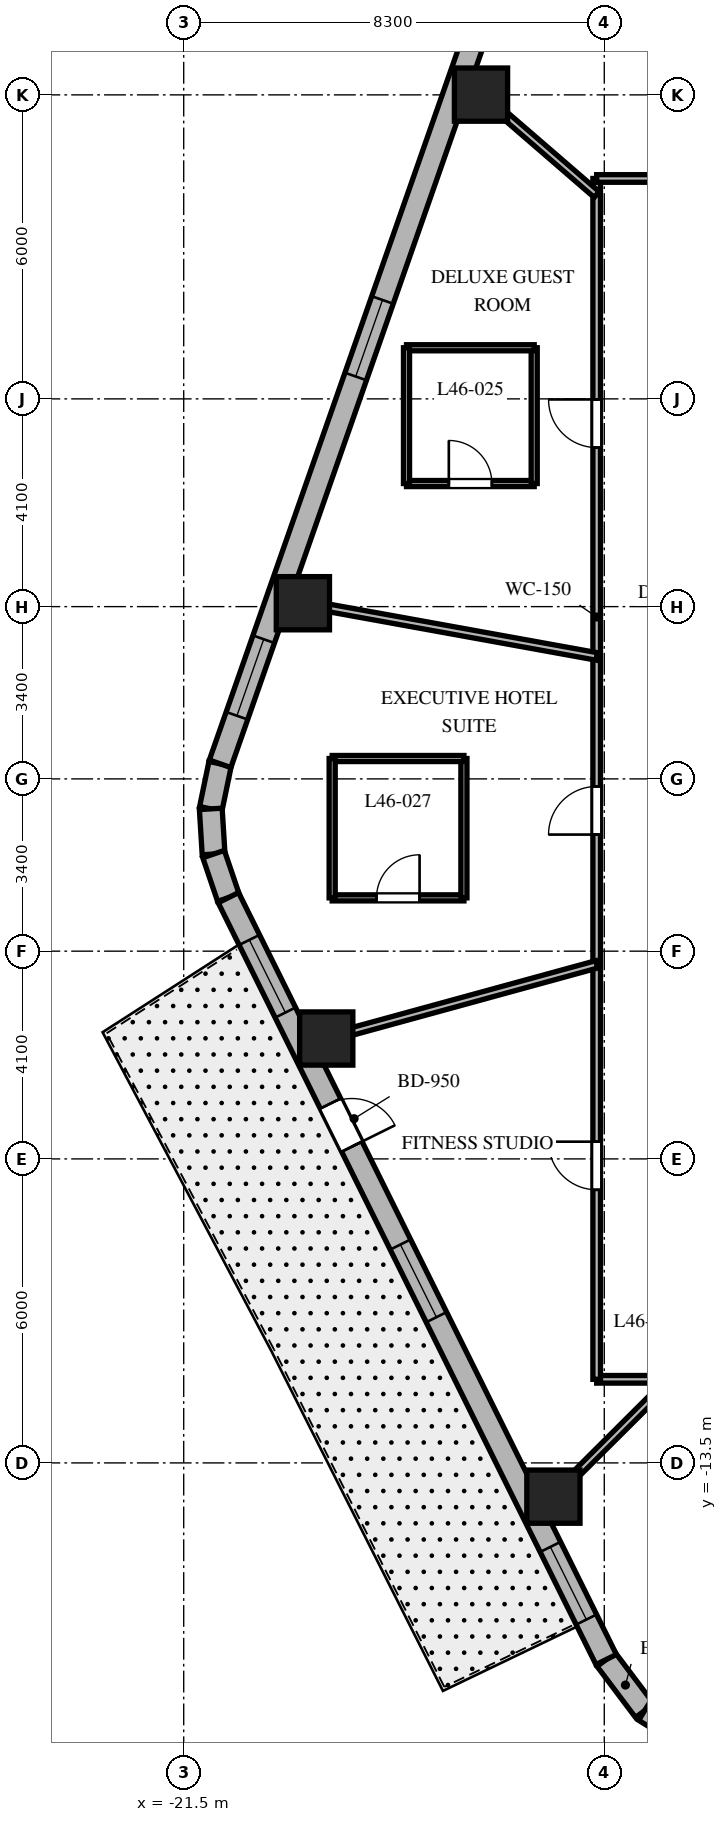
"""IFC4 building model, lengths in metres.
Left out: names, types, materials, properties, quantities, classifications, styles, units other than length and angle.
Written with IfcOpenShell. Run it as: python <this file> out.ifc"""

import sys

from ifc_helpers import new_model, si_unit, direction, frame, frame_2d, origin, origin_2d, place, context, subcontext, project, spatial, rectangle, extrude, element, fill, save


model = new_model("IFC4")
c1 = context("Model", 3, precision=1e-05, world=origin(), true_north=direction((0.0, 1.0)))
c2 = subcontext(c1, "Body", "Model", "MODEL_VIEW")
j1 = project(units=[si_unit("LENGTHUNIT", "METRE"), si_unit("PLANEANGLEUNIT", "RADIAN")], contexts=[c1])
p1 = place(None, origin())
s1 = spatial("IfcSite", under=j1, at=p1, CompositionType="ELEMENT")
p2 = place(p1, origin())
s2 = spatial("IfcBuilding", under=s1, at=p2, CompositionType="ELEMENT")
p3 = place(p2, frame((0.0, 0.0, 186.7)))
s3 = spatial("IfcBuildingStorey", under=s2, at=p3, CompositionType="ELEMENT", Elevation=186.7)
for number, where, z_axis, x_axis in (
    (1, (-15.633, 13.505, 0.0), (0.0, 0.0, 1.0), (1.0, 0.0, 0.0)),
    (2, (-19.148, 3.467, 0.0), (0.0, 0.0, 1.0), (1.0, 0.0, 0.0)),
    (3, (-18.687, -5.124, 0.0), (0.0, 0.0, 1.0), (1.0, 0.0, 0.0)),
    (4, (-14.204, -14.166, 0.0), (0.0, 0.0, 1.0), (1.0, 0.0, 0.0)),
):
    element("IfcColumn", number, at=place(p3, frame(where, z_axis=z_axis, x_axis=x_axis)), inside=s3, PredefinedType="COLUMN", context=c2, shape_type="SweptSolid", body=[
        extrude(rectangle(XDim=1.05, YDim=1.05, at=origin_2d()), origin(), (0.0, 0.0, 1.0), 3.7),
    ])
p4 = place(p3, frame((-13.162, -17.381, 0.0), z_axis=(0.0, 0.0, 1.0), x_axis=(0.601515770517, -0.798860925205, 0.0)))
e5 = element("IfcWall", 5, at=p4, inside=s3, PredefinedType="SOLIDWALL", context=c2, shape_type="SweptSolid", body=[
    extrude(rectangle(XDim=1.262, YDim=0.45, at=frame_2d((0.631, 0.0))), origin(), (0.0, 0.0, 1.0), 3.4),
])
p5 = place(p3, frame((-12.403, -18.389, 0.0), z_axis=(0.0, 0.0, 1.0), x_axis=(0.849795170926, -0.527113049991, 0.0)))
e6 = element("IfcWall", 6, at=p5, inside=s3, PredefinedType="SOLIDWALL", context=c2, shape_type="SweptSolid", body=[
    extrude(rectangle(XDim=1.241, YDim=0.45, at=frame_2d((0.62, 0.0))), origin(), (0.0, 0.0, 1.0), 3.4),
])
p6 = place(p3, frame((-20.782, 0.298, 0.0), z_axis=(0.0, 0.0, 1.0), x_axis=(-0.202570068411, -0.979267771033, 0.0)))
e7 = element("IfcWall", 7, at=p6, inside=s3, PredefinedType="SOLIDWALL", context=c2, shape_type="SweptSolid", body=[
    extrude(rectangle(XDim=0.909, YDim=0.45, at=frame_2d((0.454, 0.0))), origin(), (0.0, 0.0, 1.0), 3.4),
])
p7 = place(p3, frame((-20.966, -0.592, 0.0), z_axis=(0.0, 0.0, 1.0), x_axis=(0.061748898935, -0.998091715966, 0.0)))
e8 = element("IfcWall", 8, at=p7, inside=s3, PredefinedType="SOLIDWALL", context=c2, shape_type="SweptSolid", body=[
    extrude(rectangle(XDim=0.894, YDim=0.45, at=frame_2d((0.447, 0.0))), origin(), (0.0, 0.0, 1.0), 3.4),
])
p8 = place(p3, frame((-20.911, -1.484, 0.0), z_axis=(0.0, 0.0, 1.0), x_axis=(0.321623334353, -0.946867694453, 0.0)))
e9 = element("IfcWall", 9, at=p8, inside=s3, PredefinedType="SOLIDWALL", context=c2, shape_type="SweptSolid", body=[
    extrude(rectangle(XDim=0.909, YDim=0.45, at=frame_2d((0.454, 0.0))), origin(), (0.0, 0.0, 1.0), 3.4),
])
p9 = place(p3, frame((-14.937, 16.993, 0.0), z_axis=(0.0, 0.0, 1.0), x_axis=(-0.330431575061, -0.943829949834, 0.0)))
e10 = element("IfcWall", 10, at=p9, inside=s3, PredefinedType="SOLIDWALL", context=c2, shape_type="SweptSolid", body=[
    extrude(rectangle(XDim=17.689, YDim=0.45, at=frame_2d((8.844, 0.0))), origin(), (0.0, 0.0, 1.0), 3.4),
])
p10 = place(p9, frame((0.95, 0.0, 0.8)))
e11 = element("IfcOpeningElement", 11, at=p10, cuts=e10, PredefinedType="OPENING", context=c2, shape_type="SweptSolid", body=[
    extrude(rectangle(XDim=1.6, YDim=1.75, at=frame_2d((0.8, 0.875))), frame((0.0, 0.235, 0.0), z_axis=(0.0, -1.0, 0.0), x_axis=(1.0, 0.0, 0.0)), (0.0, 0.0, 1.0), 0.47),
])
p11 = place(p9, frame((7.99, 0.0, 0.8)))
e12 = element("IfcOpeningElement", 12, at=p11, cuts=e10, PredefinedType="OPENING", context=c2, shape_type="SweptSolid", body=[
    extrude(rectangle(XDim=1.6, YDim=1.75, at=frame_2d((0.8, 0.875))), frame((0.0, 0.235, 0.0), z_axis=(0.0, -1.0, 0.0), x_axis=(1.0, 0.0, 0.0)), (0.0, 0.0, 1.0), 0.47),
])
p12 = place(p9, frame((15.084, 0.0, 0.8)))
e13 = element("IfcOpeningElement", 13, at=p12, cuts=e10, PredefinedType="OPENING", context=c2, shape_type="SweptSolid", body=[
    extrude(rectangle(XDim=1.6, YDim=1.75, at=frame_2d((0.8, 0.875))), frame((0.0, 0.235, 0.0), z_axis=(0.0, -1.0, 0.0), x_axis=(1.0, 0.0, 0.0)), (0.0, 0.0, 1.0), 0.47),
])
p13 = place(p3, frame((-20.618, -2.344, 0.0), z_axis=(0.0, 0.0, 1.0), x_axis=(0.444243691097, -0.895905990002, 0.0)))
e14 = element("IfcWall", 14, at=p13, inside=s3, PredefinedType="SOLIDWALL", context=c2, shape_type="SweptSolid", body=[
    extrude(rectangle(XDim=16.784, YDim=0.45, at=frame_2d((8.392, 0.0))), origin(), (0.0, 0.0, 1.0), 3.4),
])
p14 = place(p13, frame((4.535, 0.0, 0.0)))
e15 = element("IfcOpeningElement", 15, at=p14, cuts=e14, PredefinedType="OPENING", context=c2, shape_type="SweptSolid", body=[
    extrude(rectangle(XDim=0.95, YDim=2.15, at=frame_2d((0.475, 1.075))), frame((0.0, 0.235, 0.0), z_axis=(0.0, -1.0, 0.0), x_axis=(1.0, 0.0, 0.0)), (0.0, 0.0, 1.0), 0.47),
])
p15 = place(p13, frame((0.931, 0.0, 0.8)))
e16 = element("IfcOpeningElement", 16, at=p15, cuts=e14, PredefinedType="OPENING", context=c2, shape_type="SweptSolid", body=[
    extrude(rectangle(XDim=1.6, YDim=1.75, at=frame_2d((0.8, 0.875))), frame((0.0, 0.235, 0.0), z_axis=(0.0, -1.0, 0.0), x_axis=(1.0, 0.0, 0.0)), (0.0, 0.0, 1.0), 0.47),
])
p16 = place(p13, frame((7.642, 0.0, 0.8)))
e17 = element("IfcOpeningElement", 17, at=p16, cuts=e14, PredefinedType="OPENING", context=c2, shape_type="SweptSolid", body=[
    extrude(rectangle(XDim=1.6, YDim=1.75, at=frame_2d((0.8, 0.875))), frame((0.0, 0.235, 0.0), z_axis=(0.0, -1.0, 0.0), x_axis=(1.0, 0.0, 0.0)), (0.0, 0.0, 1.0), 0.47),
])
p17 = place(p13, frame((14.303, 0.0, 0.8)))
e18 = element("IfcOpeningElement", 18, at=p17, cuts=e14, PredefinedType="OPENING", context=c2, shape_type="SweptSolid", body=[
    extrude(rectangle(XDim=1.6, YDim=1.75, at=frame_2d((0.8, 0.875))), frame((0.0, 0.235, 0.0), z_axis=(0.0, -1.0, 0.0), x_axis=(1.0, 0.0, 0.0)), (0.0, 0.0, 1.0), 0.47),
])
p18 = place(p3, frame((13.35, -11.85, 0.0), z_axis=(0.0, 0.0, 1.0), x_axis=(-1.0, 0.0, 0.0)))
e19 = element("IfcWall", 19, at=p18, inside=s3, PredefinedType="PARTITIONING", context=c2, shape_type="SweptSolid", body=[
    extrude(rectangle(XDim=26.7, YDim=0.15, at=frame_2d((13.35, 0.0))), origin(), (0.0, 0.0, 1.0), 2.84),
])
p19 = place(p18, frame((22.459, 0.0, 0.0)))
e20 = element("IfcOpeningElement", 20, at=p19, cuts=e19, PredefinedType="OPENING", context=c2, shape_type="SweptSolid", body=[
    extrude(rectangle(XDim=0.9, YDim=2.03, at=frame_2d((0.45, 1.015))), frame((0.0, 0.085, 0.0), z_axis=(0.0, -1.0, 0.0), x_axis=(1.0, 0.0, 0.0)), (0.0, 0.0, 1.0), 0.17),
])
p20 = place(p18, frame((18.304, 0.0, 0.0)))
e21 = element("IfcOpeningElement", 21, at=p20, cuts=e19, PredefinedType="OPENING", context=c2, shape_type="SweptSolid", body=[
    extrude(rectangle(XDim=0.9, YDim=2.03, at=frame_2d((0.45, 1.015))), frame((0.0, 0.085, 0.0), z_axis=(0.0, -1.0, 0.0), x_axis=(1.0, 0.0, 0.0)), (0.0, 0.0, 1.0), 0.17),
])
p21 = place(p18, frame((12.362, 0.0, 0.0)))
e22 = element("IfcOpeningElement", 22, at=p21, cuts=e19, PredefinedType="OPENING", context=c2, shape_type="SweptSolid", body=[
    extrude(rectangle(XDim=0.95, YDim=2.03, at=frame_2d((0.475, 1.015))), frame((0.0, 0.085, 0.0), z_axis=(0.0, -1.0, 0.0), x_axis=(1.0, 0.0, 0.0)), (0.0, 0.0, 1.0), 0.17),
])
p22 = place(p18, frame((3.995, 0.0, 0.0)))
e23 = element("IfcOpeningElement", 23, at=p22, cuts=e19, PredefinedType="OPENING", context=c2, shape_type="SweptSolid", body=[
    extrude(rectangle(XDim=0.95, YDim=2.03, at=frame_2d((0.475, 1.015))), frame((0.0, 0.085, 0.0), z_axis=(0.0, -1.0, 0.0), x_axis=(1.0, 0.0, 0.0)), (0.0, 0.0, 1.0), 0.17),
])
p23 = place(p3, frame((-13.35, -11.85, 0.0), z_axis=(0.0, 0.0, 1.0), x_axis=(0.0, 1.0, 0.0)))
e24 = element("IfcWall", 24, at=p23, inside=s3, PredefinedType="PARTITIONING", context=c2, shape_type="SweptSolid", body=[
    extrude(rectangle(XDim=23.7, YDim=0.15, at=frame_2d((11.85, 0.0))), origin(), (0.0, 0.0, 1.0), 2.84),
])
p24 = place(p23, frame((18.389, 0.0, 0.0)))
e25 = element("IfcOpeningElement", 25, at=p24, cuts=e24, PredefinedType="OPENING", context=c2, shape_type="SweptSolid", body=[
    extrude(rectangle(XDim=0.95, YDim=2.03, at=frame_2d((0.475, 1.015))), frame((0.0, 0.085, 0.0), z_axis=(0.0, -1.0, 0.0), x_axis=(1.0, 0.0, 0.0)), (0.0, 0.0, 1.0), 0.17),
])
p25 = place(p23, frame((10.751, 0.0, 0.0)))
e26 = element("IfcOpeningElement", 26, at=p25, cuts=e24, PredefinedType="OPENING", context=c2, shape_type="SweptSolid", body=[
    extrude(rectangle(XDim=0.95, YDim=2.03, at=frame_2d((0.475, 1.015))), frame((0.0, 0.085, 0.0), z_axis=(0.0, -1.0, 0.0), x_axis=(1.0, 0.0, 0.0)), (0.0, 0.0, 1.0), 0.17),
])
p26 = place(p23, frame((3.74, 0.0, 0.0)))
e27 = element("IfcOpeningElement", 27, at=p26, cuts=e24, PredefinedType="OPENING", context=c2, shape_type="SweptSolid", body=[
    extrude(rectangle(XDim=0.95, YDim=2.03, at=frame_2d((0.475, 1.015))), frame((0.0, 0.085, 0.0), z_axis=(0.0, -1.0, 0.0), x_axis=(1.0, 0.0, 0.0)), (0.0, 0.0, 1.0), 0.17),
])
p27 = place(p3, frame((-13.35, 11.85, 0.0), z_axis=(0.0, 0.0, 1.0), x_axis=(1.0, 0.0, 0.0)))
e28 = element("IfcWall", 28, at=p27, inside=s3, PredefinedType="PARTITIONING", context=c2, shape_type="SweptSolid", body=[
    extrude(rectangle(XDim=26.7, YDim=0.15, at=frame_2d((13.35, 0.0))), origin(), (0.0, 0.0, 1.0), 2.84),
])
p28 = place(p27, frame((20.682, 0.0, 0.0)))
e29 = element("IfcOpeningElement", 29, at=p28, cuts=e28, PredefinedType="OPENING", context=c2, shape_type="SweptSolid", body=[
    extrude(rectangle(XDim=0.95, YDim=2.03, at=frame_2d((0.475, 1.015))), frame((0.0, 0.085, 0.0), z_axis=(0.0, -1.0, 0.0), x_axis=(1.0, 0.0, 0.0)), (0.0, 0.0, 1.0), 0.17),
])
p29 = place(p27, frame((12.362, 0.0, 0.0)))
e30 = element("IfcOpeningElement", 30, at=p29, cuts=e28, PredefinedType="OPENING", context=c2, shape_type="SweptSolid", body=[
    extrude(rectangle(XDim=0.95, YDim=2.03, at=frame_2d((0.475, 1.015))), frame((0.0, 0.085, 0.0), z_axis=(0.0, -1.0, 0.0), x_axis=(1.0, 0.0, 0.0)), (0.0, 0.0, 1.0), 0.17),
])
p30 = place(p27, frame((3.995, 0.0, 0.0)))
e31 = element("IfcOpeningElement", 31, at=p30, cuts=e28, PredefinedType="OPENING", context=c2, shape_type="SweptSolid", body=[
    extrude(rectangle(XDim=0.95, YDim=2.03, at=frame_2d((0.475, 1.015))), frame((0.0, 0.085, 0.0), z_axis=(0.0, -1.0, 0.0), x_axis=(1.0, 0.0, 0.0)), (0.0, 0.0, 1.0), 0.17),
])
p31 = place(p3, frame((-13.35, 11.533, 0.0), z_axis=(0.0, 0.0, 1.0), x_axis=(-0.756711647314, 0.65374879183, 0.0)))
e32 = element("IfcWall", 32, at=p31, inside=s3, PredefinedType="PARTITIONING", context=c2, shape_type="SweptSolid", body=[
    extrude(rectangle(XDim=3.55, YDim=0.15, at=frame_2d((1.775, 0.0))), origin(), (0.0, 0.0, 1.0), 2.64),
])
p32 = place(p3, frame((-13.35, 2.417, 0.0), z_axis=(0.0, 0.0, 1.0), x_axis=(-0.98399796473, 0.178179699761, 0.0)))
e33 = element("IfcWall", 33, at=p32, inside=s3, PredefinedType="PARTITIONING", context=c2, shape_type="SweptSolid", body=[
    extrude(rectangle(XDim=6.393, YDim=0.15, at=frame_2d((3.197, 0.0))), origin(), (0.0, 0.0, 1.0), 2.64),
])
p33 = place(p3, frame((-13.35, -3.661, 0.0), z_axis=(0.0, 0.0, 1.0), x_axis=(-0.964397145454, -0.264458211898, 0.0)))
e34 = element("IfcWall", 34, at=p33, inside=s3, PredefinedType="PARTITIONING", context=c2, shape_type="SweptSolid", body=[
    extrude(rectangle(XDim=6.039, YDim=0.15, at=frame_2d((3.019, 0.0))), origin(), (0.0, 0.0, 1.0), 2.64),
])
p34 = place(p3, frame((-11.882, -11.85, 0.0), z_axis=(0.0, 0.0, 1.0), x_axis=(-0.708037373639, -0.706174962407, 0.0)))
e35 = element("IfcWall", 35, at=p34, inside=s3, PredefinedType="PARTITIONING", context=c2, shape_type="SweptSolid", body=[
    extrude(rectangle(XDim=3.802, YDim=0.15, at=frame_2d((1.901, 0.0))), origin(), (0.0, 0.0, 1.0), 2.64),
])
p35 = place(p3, frame((-17.103, 5.829, 0.0), z_axis=(0.0, 0.0, 1.0), x_axis=(1.0, 0.0, 0.0)))
e36 = element("IfcWall", 36, at=p35, inside=s3, PredefinedType="PARTITIONING", context=c2, shape_type="SweptSolid", body=[
    extrude(rectangle(XDim=2.52, YDim=0.12, at=frame_2d((1.26, 0.0))), origin(), (0.0, 0.0, 1.0), 2.972),
])
p36 = place(p35, frame((0.835, 0.0, 0.0)))
e37 = element("IfcOpeningElement", 37, at=p36, cuts=e36, PredefinedType="OPENING", context=c2, shape_type="SweptSolid", body=[
    extrude(rectangle(XDim=0.85, YDim=2.03, at=frame_2d((0.425, 1.015))), frame((0.0, 0.07, 0.0), z_axis=(0.0, -1.0, 0.0), x_axis=(1.0, 0.0, 0.0)), (0.0, 0.0, 1.0), 0.14),
])
p37 = place(p3, frame((-14.583, 5.829, 0.0), z_axis=(0.0, 0.0, 1.0), x_axis=(0.0, 1.0, 0.0)))
e38 = element("IfcWall", 38, at=p37, inside=s3, PredefinedType="PARTITIONING", context=c2, shape_type="SweptSolid", body=[
    extrude(rectangle(XDim=2.68, YDim=0.12, at=frame_2d((1.34, 0.0))), origin(), (0.0, 0.0, 1.0), 2.972),
])
p38 = place(p3, frame((-14.583, 8.509, 0.0), z_axis=(0.0, 0.0, 1.0), x_axis=(-1.0, 0.0, 0.0)))
e39 = element("IfcWall", 39, at=p38, inside=s3, PredefinedType="PARTITIONING", context=c2, shape_type="SweptSolid", body=[
    extrude(rectangle(XDim=2.52, YDim=0.12, at=frame_2d((1.26, 0.0))), origin(), (0.0, 0.0, 1.0), 2.972),
])
p39 = place(p3, frame((-17.103, 8.509, 0.0), z_axis=(0.0, 0.0, 1.0), x_axis=(0.0, -1.0, 0.0)))
e40 = element("IfcWall", 40, at=p39, inside=s3, PredefinedType="PARTITIONING", context=c2, shape_type="SweptSolid", body=[
    extrude(rectangle(XDim=2.68, YDim=0.12, at=frame_2d((1.34, 0.0))), origin(), (0.0, 0.0, 1.0), 2.64),
])
p40 = place(p3, frame((-18.57, -2.348, 0.0), z_axis=(0.0, 0.0, 1.0), x_axis=(1.0, 0.0, 0.0)))
e41 = element("IfcWall", 41, at=p40, inside=s3, PredefinedType="PARTITIONING", context=c2, shape_type="SweptSolid", body=[
    extrude(rectangle(XDim=2.6, YDim=0.12, at=frame_2d((1.3, 0.0))), origin(), (0.0, 0.0, 1.0), 3.4),
])
p41 = place(p40, frame((0.875, 0.0, 0.0)))
e42 = element("IfcOpeningElement", 42, at=p41, cuts=e41, PredefinedType="OPENING", context=c2, shape_type="SweptSolid", body=[
    extrude(rectangle(XDim=0.85, YDim=2.03, at=frame_2d((0.425, 1.015))), frame((0.0, 0.07, 0.0), z_axis=(0.0, -1.0, 0.0), x_axis=(1.0, 0.0, 0.0)), (0.0, 0.0, 1.0), 0.14),
])
p42 = place(p3, frame((-15.97, -2.348, 0.0), z_axis=(0.0, 0.0, 1.0), x_axis=(0.0, 1.0, 0.0)))
e43 = element("IfcWall", 43, at=p42, inside=s3, PredefinedType="PARTITIONING", context=c2, shape_type="SweptSolid", body=[
    extrude(rectangle(XDim=2.75, YDim=0.12, at=frame_2d((1.375, 0.0))), origin(), (0.0, 0.0, 1.0), 3.4),
])
p43 = place(p3, frame((-15.97, 0.402, 0.0), z_axis=(0.0, 0.0, 1.0), x_axis=(-1.0, 0.0, 0.0)))
e44 = element("IfcWall", 44, at=p43, inside=s3, PredefinedType="PARTITIONING", context=c2, shape_type="SweptSolid", body=[
    extrude(rectangle(XDim=2.6, YDim=0.12, at=frame_2d((1.3, 0.0))), origin(), (0.0, 0.0, 1.0), 3.4),
])
p44 = place(p3, frame((-18.57, 0.402, 0.0), z_axis=(0.0, 0.0, 1.0), x_axis=(0.0, -1.0, 0.0)))
e45 = element("IfcWall", 45, at=p44, inside=s3, PredefinedType="PARTITIONING", context=c2, shape_type="SweptSolid", body=[
    extrude(rectangle(XDim=2.75, YDim=0.12, at=frame_2d((1.375, 0.0))), origin(), (0.0, 0.0, 1.0), 2.64),
])
p45 = place(p11, origin())
e46 = element("IfcWindow", 46, at=p45, inside=s3, PartitioningType="SINGLE_PANEL", PredefinedType="WINDOW", context=c2, shape_type="SweptSolid", body=[
    extrude(rectangle(XDim=1.6, YDim=1.75, at=frame_2d((0.8, 0.875))), frame((0.0, 0.03, 0.0), z_axis=(0.0, -1.0, 0.0), x_axis=(1.0, 0.0, 0.0)), (0.0, 0.0, 1.0), 0.06),
])
fill(e12, e46)
p46 = place(p12, origin())
e47 = element("IfcWindow", 47, at=p46, inside=s3, PartitioningType="SINGLE_PANEL", PredefinedType="WINDOW", context=c2, shape_type="SweptSolid", body=[
    extrude(rectangle(XDim=1.6, YDim=1.75, at=frame_2d((0.8, 0.875))), frame((0.0, 0.03, 0.0), z_axis=(0.0, -1.0, 0.0), x_axis=(1.0, 0.0, 0.0)), (0.0, 0.0, 1.0), 0.06),
])
fill(e13, e47)
p47 = place(p14, origin())
e48 = element("IfcDoor", 48, at=p47, inside=s3, OperationType="SINGLE_SWING_RIGHT", PredefinedType="DOOR", context=c2, shape_type="SweptSolid", body=[
    extrude(rectangle(XDim=0.95, YDim=2.15, at=frame_2d((0.475, 1.075))), frame((0.0, 0.025, 0.0), z_axis=(0.0, -1.0, 0.0), x_axis=(1.0, 0.0, 0.0)), (0.0, 0.0, 1.0), 0.05),
])
fill(e15, e48)
p48 = place(p15, origin())
e49 = element("IfcWindow", 49, at=p48, inside=s3, PartitioningType="SINGLE_PANEL", PredefinedType="WINDOW", context=c2, shape_type="SweptSolid", body=[
    extrude(rectangle(XDim=1.6, YDim=1.75, at=frame_2d((0.8, 0.875))), frame((0.0, 0.03, 0.0), z_axis=(0.0, -1.0, 0.0), x_axis=(1.0, 0.0, 0.0)), (0.0, 0.0, 1.0), 0.06),
])
fill(e16, e49)
p49 = place(p16, origin())
e50 = element("IfcWindow", 50, at=p49, inside=s3, PartitioningType="SINGLE_PANEL", PredefinedType="WINDOW", context=c2, shape_type="SweptSolid", body=[
    extrude(rectangle(XDim=1.6, YDim=1.75, at=frame_2d((0.8, 0.875))), frame((0.0, 0.03, 0.0), z_axis=(0.0, -1.0, 0.0), x_axis=(1.0, 0.0, 0.0)), (0.0, 0.0, 1.0), 0.06),
])
fill(e17, e50)
p50 = place(p17, origin())
e51 = element("IfcWindow", 51, at=p50, inside=s3, PartitioningType="SINGLE_PANEL", PredefinedType="WINDOW", context=c2, shape_type="SweptSolid", body=[
    extrude(rectangle(XDim=1.6, YDim=1.75, at=frame_2d((0.8, 0.875))), frame((0.0, 0.03, 0.0), z_axis=(0.0, -1.0, 0.0), x_axis=(1.0, 0.0, 0.0)), (0.0, 0.0, 1.0), 0.06),
])
fill(e18, e51)
p51 = place(p24, origin())
e52 = element("IfcDoor", 52, at=p51, inside=s3, OperationType="SINGLE_SWING_RIGHT", PredefinedType="DOOR", context=c2, shape_type="SweptSolid", body=[
    extrude(rectangle(XDim=0.95, YDim=2.03, at=frame_2d((0.475, 1.015))), frame((0.0, 0.025, 0.0), z_axis=(0.0, -1.0, 0.0), x_axis=(1.0, 0.0, 0.0)), (0.0, 0.0, 1.0), 0.05),
])
fill(e25, e52)
p52 = place(p36, origin())
e53 = element("IfcDoor", 53, at=p52, inside=s3, OperationType="SINGLE_SWING_LEFT", PredefinedType="DOOR", context=c2, shape_type="SweptSolid", body=[
    extrude(rectangle(XDim=0.85, YDim=2.03, at=frame_2d((0.425, 1.015))), frame((0.0, 0.025, 0.0), z_axis=(0.0, -1.0, 0.0), x_axis=(1.0, 0.0, 0.0)), (0.0, 0.0, 1.0), 0.05),
])
fill(e37, e53)
p53 = place(p25, origin())
e54 = element("IfcDoor", 54, at=p53, inside=s3, OperationType="SINGLE_SWING_LEFT", PredefinedType="DOOR", context=c2, shape_type="SweptSolid", body=[
    extrude(rectangle(XDim=0.95, YDim=2.03, at=frame_2d((0.475, 1.015))), frame((0.0, 0.025, 0.0), z_axis=(0.0, -1.0, 0.0), x_axis=(1.0, 0.0, 0.0)), (0.0, 0.0, 1.0), 0.05),
])
fill(e26, e54)
p54 = place(p41, origin())
e55 = element("IfcDoor", 55, at=p54, inside=s3, OperationType="SINGLE_SWING_RIGHT", PredefinedType="DOOR", context=c2, shape_type="SweptSolid", body=[
    extrude(rectangle(XDim=0.85, YDim=2.03, at=frame_2d((0.425, 1.015))), frame((0.0, 0.025, 0.0), z_axis=(0.0, -1.0, 0.0), x_axis=(1.0, 0.0, 0.0)), (0.0, 0.0, 1.0), 0.05),
])
fill(e42, e55)
p55 = place(p26, origin())
e56 = element("IfcDoor", 56, at=p55, inside=s3, OperationType="SINGLE_SWING_RIGHT", PredefinedType="DOOR", context=c2, shape_type="SweptSolid", body=[
    extrude(rectangle(XDim=0.95, YDim=2.03, at=frame_2d((0.475, 1.015))), frame((0.0, 0.025, 0.0), z_axis=(0.0, -1.0, 0.0), x_axis=(1.0, 0.0, 0.0)), (0.0, 0.0, 1.0), 0.05),
])
fill(e27, e56)
save(model, sys.argv[1])
